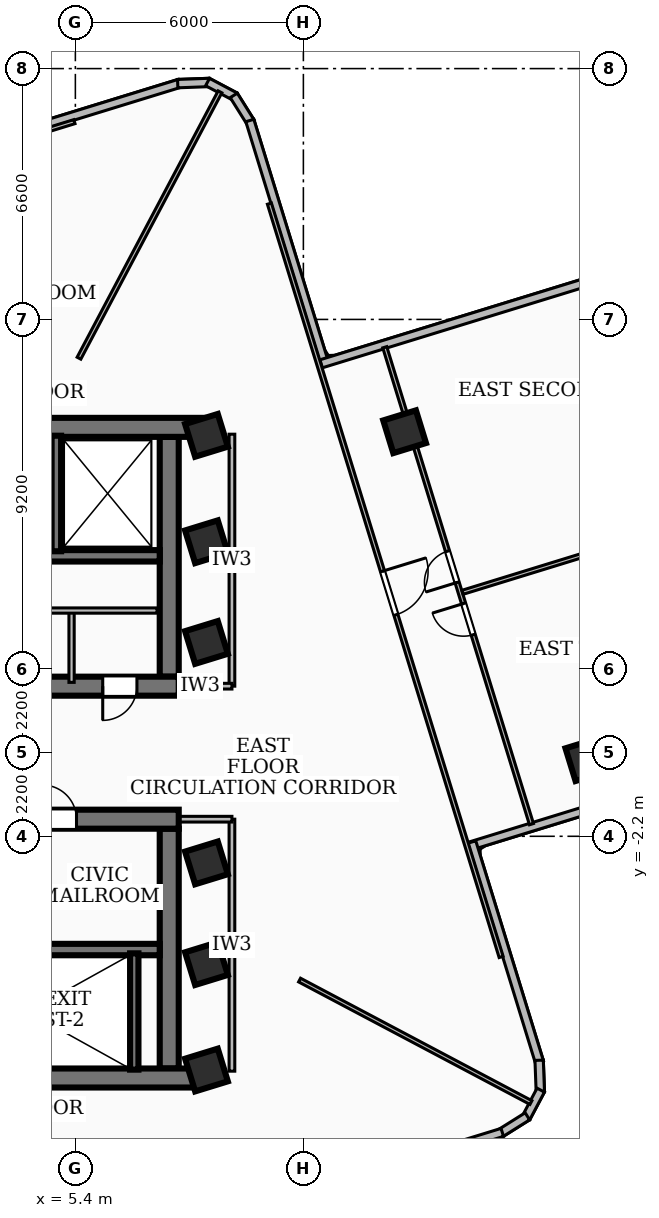
"""IFC4 building model, lengths in metres.
Left out: names, types, materials, properties, quantities, classifications, styles, units other than length and angle.
Written with IfcOpenShell. Run it as: python <this file> out.ifc"""

import sys

from ifc_helpers import new_model, si_unit, direction, frame, frame_2d, origin, origin_2d, place, context, subcontext, project, spatial, rectangle, extrude, element, fill, save


model = new_model("IFC4")
c1 = context("Model", 3, precision=1e-05, world=origin(), true_north=direction((0.0, 1.0)))
c2 = subcontext(c1, "Body", "Model", "MODEL_VIEW")
j1 = project(units=[si_unit("LENGTHUNIT", "METRE"), si_unit("PLANEANGLEUNIT", "RADIAN")], contexts=[c1])
p1 = place(None, origin())
s1 = spatial("IfcSite", under=j1, at=p1, CompositionType="ELEMENT")
p2 = place(p1, origin())
s2 = spatial("IfcBuilding", under=s1, at=p2, CompositionType="ELEMENT")
p3 = place(p2, frame((0.0, 0.0, 148.68)))
s3 = spatial("IfcBuildingStorey", under=s2, at=p3, CompositionType="ELEMENT", Elevation=148.68)
p4 = place(p3, frame((-8.78, 8.56, 0.0), z_axis=(0.0, 0.0, 1.0), x_axis=(1.0, 0.0, 0.0)))
e1 = element("IfcWall", 1, at=p4, inside=s3, PredefinedType="SHEAR", context=c2, shape_type="SweptSolid", body=[
    extrude(rectangle(XDim=17.56, YDim=0.5, at=frame_2d((8.78, 0.0))), origin(), (0.0, 0.0, 1.0), 3.32),
])
p5 = place(p3, frame((8.12, 1.75, 0.0), z_axis=(0.0, 0.0, 1.0), x_axis=(-1.0, 0.0, 0.0)))
e2 = element("IfcWall", 2, at=p5, inside=s3, PredefinedType="SHEAR", context=c2, shape_type="SweptSolid", body=[
    extrude(rectangle(XDim=16.24, YDim=0.5, at=frame_2d((8.12, 0.0))), origin(), (0.0, 0.0, 1.0), 3.32),
])
p6 = place(p5, frame((7.45, 0.0, 0.0)))
e3 = element("IfcOpeningElement", 3, at=p6, cuts=e2, PredefinedType="OPENING", context=c2, shape_type="SweptSolid", body=[
    extrude(rectangle(XDim=1.0, YDim=2.1, at=frame_2d((0.5, 1.05))), frame((0.0, 0.26, 0.0), z_axis=(0.0, -1.0, 0.0), x_axis=(1.0, 0.0, 0.0)), (0.0, 0.0, 1.0), 0.52),
])
p7 = place(p5, frame((3.4, 0.0, 0.0)))
e4 = element("IfcOpeningElement", 4, at=p7, cuts=e2, PredefinedType="OPENING", context=c2, shape_type="SweptSolid", body=[
    extrude(rectangle(XDim=0.9, YDim=2.06, at=frame_2d((0.45, 1.03))), frame((0.0, 0.26, 0.0), z_axis=(0.0, -1.0, 0.0), x_axis=(1.0, 0.0, 0.0)), (0.0, 0.0, 1.0), 0.52),
])
p8 = place(p5, frame((1.1, 0.0, 0.0)))
e5 = element("IfcOpeningElement", 5, at=p8, cuts=e2, PredefinedType="OPENING", context=c2, shape_type="SweptSolid", body=[
    extrude(rectangle(XDim=0.9, YDim=2.06, at=frame_2d((0.45, 1.03))), frame((0.0, 0.26, 0.0), z_axis=(0.0, -1.0, 0.0), x_axis=(1.0, 0.0, 0.0)), (0.0, 0.0, 1.0), 0.52),
])
p9 = place(p3, frame((7.87, 8.31, 0.0), z_axis=(0.0, 0.0, 1.0), x_axis=(0.0, -1.0, 0.0)))
e6 = element("IfcWall", 6, at=p9, inside=s3, PredefinedType="SHEAR", context=c2, shape_type="SweptSolid", body=[
    extrude(rectangle(XDim=6.31, YDim=0.5, at=frame_2d((3.155, 0.0))), origin(), (0.0, 0.0, 1.0), 3.32),
])
p10 = place(p3, frame((7.62, 5.18, 0.0), z_axis=(0.0, 0.0, 1.0), x_axis=(-1.0, 0.0, 0.0)))
e7 = element("IfcWall", 7, at=p10, inside=s3, PredefinedType="SOLIDWALL", context=c2, shape_type="SweptSolid", body=[
    extrude(rectangle(XDim=15.24, YDim=0.3, at=frame_2d((7.62, 0.0))), origin(), (0.0, 0.0, 1.0), 3.32),
])
p11 = place(p10, frame((5.77, 0.0, 0.0)))
e8 = element("IfcOpeningElement", 8, at=p11, cuts=e7, PredefinedType="OPENING", context=c2, shape_type="SweptSolid", body=[
    extrude(rectangle(XDim=1.1, YDim=2.15, at=frame_2d((0.55, 1.075))), frame((0.0, 0.16, 0.0), z_axis=(0.0, -1.0, 0.0), x_axis=(1.0, 0.0, 0.0)), (0.0, 0.0, 1.0), 0.32),
])
p12 = place(p10, frame((2.97, 0.0, 0.0)))
e9 = element("IfcOpeningElement", 9, at=p12, cuts=e7, PredefinedType="OPENING", context=c2, shape_type="SweptSolid", body=[
    extrude(rectangle(XDim=1.1, YDim=2.15, at=frame_2d((0.55, 1.075))), frame((0.0, 0.16, 0.0), z_axis=(0.0, -1.0, 0.0), x_axis=(1.0, 0.0, 0.0)), (0.0, 0.0, 1.0), 0.32),
])
p13 = place(p10, frame((7.97, 0.0, 0.0)))
e10 = element("IfcOpeningElement", 10, at=p13, cuts=e7, PredefinedType="OPENING", context=c2, shape_type="SweptSolid", body=[
    extrude(rectangle(XDim=1.0, YDim=2.1, at=frame_2d((0.5, 1.05))), frame((0.0, 0.16, 0.0), z_axis=(0.0, -1.0, 0.0), x_axis=(1.0, 0.0, 0.0)), (0.0, 0.0, 1.0), 0.32),
])
p14 = place(p3, frame((8.78, -8.56, 0.0), z_axis=(0.0, 0.0, 1.0), x_axis=(-1.0, 0.0, 0.0)))
e11 = element("IfcWall", 11, at=p14, inside=s3, PredefinedType="SHEAR", context=c2, shape_type="SweptSolid", body=[
    extrude(rectangle(XDim=17.56, YDim=0.5, at=frame_2d((8.78, 0.0))), origin(), (0.0, 0.0, 1.0), 3.32),
])
p15 = place(p3, frame((-8.12, -1.75, 0.0), z_axis=(0.0, 0.0, 1.0), x_axis=(1.0, 0.0, 0.0)))
e12 = element("IfcWall", 12, at=p15, inside=s3, PredefinedType="SHEAR", context=c2, shape_type="SweptSolid", body=[
    extrude(rectangle(XDim=16.24, YDim=0.5, at=frame_2d((8.12, 0.0))), origin(), (0.0, 0.0, 1.0), 3.32),
])
p16 = place(p15, frame((7.45, 0.0, 0.0)))
e13 = element("IfcOpeningElement", 13, at=p16, cuts=e12, PredefinedType="OPENING", context=c2, shape_type="SweptSolid", body=[
    extrude(rectangle(XDim=1.0, YDim=2.1, at=frame_2d((0.5, 1.05))), frame((0.0, 0.26, 0.0), z_axis=(0.0, -1.0, 0.0), x_axis=(1.0, 0.0, 0.0)), (0.0, 0.0, 1.0), 0.52),
])
p17 = place(p15, frame((12.65, 0.0, 0.0)))
e14 = element("IfcOpeningElement", 14, at=p17, cuts=e12, PredefinedType="OPENING", context=c2, shape_type="SweptSolid", body=[
    extrude(rectangle(XDim=0.9, YDim=2.06, at=frame_2d((0.45, 1.03))), frame((0.0, 0.26, 0.0), z_axis=(0.0, -1.0, 0.0), x_axis=(1.0, 0.0, 0.0)), (0.0, 0.0, 1.0), 0.52),
])
p18 = place(p15, frame((0.565, 0.0, 0.0)))
e15 = element("IfcOpeningElement", 15, at=p18, cuts=e12, PredefinedType="OPENING", context=c2, shape_type="SweptSolid", body=[
    extrude(rectangle(XDim=1.05, YDim=2.15, at=frame_2d((0.525, 1.075))), frame((0.0, 0.26, 0.0), z_axis=(0.0, -1.0, 0.0), x_axis=(1.0, 0.0, 0.0)), (0.0, 0.0, 1.0), 0.52),
])
p19 = place(p15, frame((2.125, 0.0, 0.0)))
e16 = element("IfcOpeningElement", 16, at=p19, cuts=e12, PredefinedType="OPENING", context=c2, shape_type="SweptSolid", body=[
    extrude(rectangle(XDim=1.05, YDim=2.15, at=frame_2d((0.525, 1.075))), frame((0.0, 0.26, 0.0), z_axis=(0.0, -1.0, 0.0), x_axis=(1.0, 0.0, 0.0)), (0.0, 0.0, 1.0), 0.52),
])
p20 = place(p15, frame((3.685, 0.0, 0.0)))
e17 = element("IfcOpeningElement", 17, at=p20, cuts=e12, PredefinedType="OPENING", context=c2, shape_type="SweptSolid", body=[
    extrude(rectangle(XDim=1.05, YDim=2.15, at=frame_2d((0.525, 1.075))), frame((0.0, 0.26, 0.0), z_axis=(0.0, -1.0, 0.0), x_axis=(1.0, 0.0, 0.0)), (0.0, 0.0, 1.0), 0.52),
])
p21 = place(p3, frame((7.87, -2.0, 0.0), z_axis=(0.0, 0.0, 1.0), x_axis=(0.0, -1.0, 0.0)))
e18 = element("IfcWall", 18, at=p21, inside=s3, PredefinedType="SHEAR", context=c2, shape_type="SweptSolid", body=[
    extrude(rectangle(XDim=6.31, YDim=0.5, at=frame_2d((3.155, 0.0))), origin(), (0.0, 0.0, 1.0), 3.32),
])
p22 = place(p3, frame((-7.62, -5.18, 0.0), z_axis=(0.0, 0.0, 1.0), x_axis=(1.0, 0.0, 0.0)))
e19 = element("IfcWall", 19, at=p22, inside=s3, PredefinedType="SOLIDWALL", context=c2, shape_type="SweptSolid", body=[
    extrude(rectangle(XDim=15.24, YDim=0.3, at=frame_2d((7.62, 0.0))), origin(), (0.0, 0.0, 1.0), 3.32),
])
p23 = place(p22, frame((5.77, 0.0, 0.0)))
e20 = element("IfcOpeningElement", 20, at=p23, cuts=e19, PredefinedType="OPENING", context=c2, shape_type="SweptSolid", body=[
    extrude(rectangle(XDim=1.1, YDim=2.15, at=frame_2d((0.55, 1.075))), frame((0.0, 0.16, 0.0), z_axis=(0.0, -1.0, 0.0), x_axis=(1.0, 0.0, 0.0)), (0.0, 0.0, 1.0), 0.32),
])
p24 = place(p22, frame((7.97, 0.0, 0.0)))
e21 = element("IfcOpeningElement", 21, at=p24, cuts=e19, PredefinedType="OPENING", context=c2, shape_type="SweptSolid", body=[
    extrude(rectangle(XDim=1.0, YDim=2.1, at=frame_2d((0.5, 1.05))), frame((0.0, 0.16, 0.0), z_axis=(0.0, -1.0, 0.0), x_axis=(1.0, 0.0, 0.0)), (0.0, 0.0, 1.0), 0.32),
])
p25 = place(p3, frame((6.95, -8.34, 0.0), z_axis=(0.0, 0.0, 1.0), x_axis=(0.0, 1.0, 0.0)))
e22 = element("IfcWall", 22, at=p25, inside=s3, PredefinedType="SOLIDWALL", context=c2, shape_type="SweptSolid", body=[
    extrude(rectangle(XDim=3.06, YDim=0.22, at=frame_2d((1.53, 0.0))), origin(), (0.0, 0.0, 1.0), 3.32),
])
p26 = place(p3, frame((4.9, 5.3, 0.0), z_axis=(0.0, 0.0, 1.0), x_axis=(0.0, 1.0, 0.0)))
e23 = element("IfcWall", 23, at=p26, inside=s3, PredefinedType="SOLIDWALL", context=c2, shape_type="SweptSolid", body=[
    extrude(rectangle(XDim=3.04, YDim=0.25, at=frame_2d((1.52, 0.0))), origin(), (0.0, 0.0, 1.0), 3.32),
])
for number, where, z_axis, x_axis in (
    (24, (8.85, -5.55, 0.0), (0.0, 0.0, 1.0), (0.956, 0.294, 0.0)),
    (25, (8.85, -2.9, 0.0), (0.0, 0.0, 1.0), (0.956, 0.294, 0.0)),
    (26, (8.85, 2.9, 0.0), (0.0, 0.0, 1.0), (0.956, 0.294, 0.0)),
    (27, (8.85, 5.55, 0.0), (0.0, 0.0, 1.0), (0.956, 0.294, 0.0)),
    (28, (8.85, -8.35, 0.0), (0.0, 0.0, 1.0), (0.956, 0.294, 0.0)),
    (29, (8.85, 8.35, 0.0), (0.0, 0.0, 1.0), (0.956, 0.294, 0.0)),
    (30, (18.86, -0.183, 0.0), (0.0, 0.0, 1.0), (0.956, 0.294, 0.0)),
    (31, (14.064, 8.445, 0.0), (0.0, 0.0, 1.0), (0.956, 0.294, 0.0)),
):
    element("IfcColumn", number, at=place(p3, frame(where, z_axis=z_axis, x_axis=x_axis)), inside=s3, PredefinedType="COLUMN", context=c2, shape_type="SweptSolid", body=[
        extrude(rectangle(XDim=0.9, YDim=0.9, at=origin_2d()), origin(), (0.0, 0.0, 1.0), 3.6),
    ])
p27 = place(p3, frame((2.351, 15.831, 0.0), z_axis=(0.0, 0.0, 1.0), x_axis=(0.955818207028, 0.293958424126, 0.0)))
e32 = element("IfcWall", 32, at=p27, inside=s3, PredefinedType="SOLIDWALL", context=c2, shape_type="SweptSolid", body=[
    extrude(rectangle(XDim=6.059, YDim=0.22, at=frame_2d((3.029, 0.0))), origin(), (0.0, 0.0, 1.0), 2.55),
])
p28 = place(p3, frame((8.093, 17.604, 0.0), z_axis=(0.0, 0.0, 1.0), x_axis=(0.999307996296, 0.037195813461, 0.0)))
e33 = element("IfcWall", 33, at=p28, inside=s3, PredefinedType="SOLIDWALL", context=c2, shape_type="SweptSolid", body=[
    extrude(rectangle(XDim=0.833, YDim=0.22, at=frame_2d((0.417, 0.0))), origin(), (0.0, 0.0, 1.0), 3.32),
])
p29 = place(p3, frame((8.879, 17.646, 0.0), z_axis=(0.0, 0.0, 1.0), x_axis=(0.883447158012, -0.46853080902, 0.0)))
e34 = element("IfcWall", 34, at=p29, inside=s3, PredefinedType="SOLIDWALL", context=c2, shape_type="SweptSolid", body=[
    extrude(rectangle(XDim=0.82, YDim=0.22, at=frame_2d((0.41, 0.0))), origin(), (0.0, 0.0, 1.0), 3.32),
])
p30 = place(p3, frame((9.568, 17.295, 0.0), z_axis=(0.0, 0.0, 1.0), x_axis=(0.531499315411, -0.847058721529, 0.0)))
e35 = element("IfcWall", 35, at=p30, inside=s3, PredefinedType="SOLIDWALL", context=c2, shape_type="SweptSolid", body=[
    extrude(rectangle(XDim=0.833, YDim=0.22, at=frame_2d((0.417, 0.0))), origin(), (0.0, 0.0, 1.0), 3.32),
])
p31 = place(p3, frame((9.991, 16.634, 0.0), z_axis=(0.0, 0.0, 1.0), x_axis=(0.294002082259, -0.955804779036, 0.0)))
e36 = element("IfcWall", 36, at=p31, inside=s3, PredefinedType="SOLIDWALL", context=c2, shape_type="SweptSolid", body=[
    extrude(rectangle(XDim=6.759, YDim=0.22, at=frame_2d((3.379, 0.0))), origin(), (0.0, 0.0, 1.0), 3.32),
])
p32 = place(p3, frame((11.868, 10.232, 0.0), z_axis=(0.0, 0.0, 1.0), x_axis=(0.955802538335, 0.29400936671, 0.0)))
e37 = element("IfcWall", 37, at=p32, inside=s3, PredefinedType="SOLIDWALL", context=c2, shape_type="SweptSolid", body=[
    extrude(rectangle(XDim=13.459, YDim=0.22, at=frame_2d((6.729, 0.0))), origin(), (0.0, 0.0, 1.0), 3.32),
])
p33 = place(p32, frame((10.259, 0.0, 0.85)))
e38 = element("IfcOpeningElement", 38, at=p33, cuts=e37, PredefinedType="OPENING", context=c2, shape_type="SweptSolid", body=[
    extrude(rectangle(XDim=2.1, YDim=1.8, at=frame_2d((1.05, 0.9))), frame((0.0, 0.12, 0.0), z_axis=(0.0, -1.0, 0.0), x_axis=(1.0, 0.0, 0.0)), (0.0, 0.0, 1.0), 0.24),
])
p34 = place(p3, frame((28.637, 1.496, 0.0), z_axis=(0.0, 0.0, 1.0), x_axis=(-0.955802538335, -0.29400936671, 0.0)))
e39 = element("IfcWall", 39, at=p34, inside=s3, PredefinedType="SOLIDWALL", context=c2, shape_type="SweptSolid", body=[
    extrude(rectangle(XDim=13.459, YDim=0.22, at=frame_2d((6.729, 0.0))), origin(), (0.0, 0.0, 1.0), 3.32),
])
p35 = place(p34, frame((0.85, 0.0, 0.85)))
e40 = element("IfcOpeningElement", 40, at=p35, cuts=e39, PredefinedType="OPENING", context=c2, shape_type="SweptSolid", body=[
    extrude(rectangle(XDim=2.7, YDim=2.1, at=frame_2d((1.35, 1.05))), frame((0.0, 0.12, 0.0), z_axis=(0.0, -1.0, 0.0), x_axis=(1.0, 0.0, 0.0)), (0.0, 0.0, 1.0), 0.24),
])
p36 = place(p3, frame((15.831, -2.351, 0.0), z_axis=(0.0, 0.0, 1.0), x_axis=(0.293958424126, -0.955818207028, 0.0)))
e41 = element("IfcWall", 41, at=p36, inside=s3, PredefinedType="SOLIDWALL", context=c2, shape_type="SweptSolid", body=[
    extrude(rectangle(XDim=6.059, YDim=0.22, at=frame_2d((3.029, 0.0))), origin(), (0.0, 0.0, 1.0), 3.32),
])
p37 = place(p3, frame((17.604, -8.093, 0.0), z_axis=(0.0, 0.0, 1.0), x_axis=(0.037195813461, -0.999307996296, 0.0)))
e42 = element("IfcWall", 42, at=p37, inside=s3, PredefinedType="SOLIDWALL", context=c2, shape_type="SweptSolid", body=[
    extrude(rectangle(XDim=0.833, YDim=0.22, at=frame_2d((0.417, 0.0))), origin(), (0.0, 0.0, 1.0), 3.32),
])
p38 = place(p3, frame((17.646, -8.879, 0.0), z_axis=(0.0, 0.0, 1.0), x_axis=(-0.46853080902, -0.883447158012, 0.0)))
e43 = element("IfcWall", 43, at=p38, inside=s3, PredefinedType="SOLIDWALL", context=c2, shape_type="SweptSolid", body=[
    extrude(rectangle(XDim=0.82, YDim=0.22, at=frame_2d((0.41, 0.0))), origin(), (0.0, 0.0, 1.0), 3.32),
])
p39 = place(p3, frame((17.295, -9.568, 0.0), z_axis=(0.0, 0.0, 1.0), x_axis=(-0.847058721529, -0.531499315411, 0.0)))
e44 = element("IfcWall", 44, at=p39, inside=s3, PredefinedType="SOLIDWALL", context=c2, shape_type="SweptSolid", body=[
    extrude(rectangle(XDim=0.833, YDim=0.22, at=frame_2d((0.417, 0.0))), origin(), (0.0, 0.0, 1.0), 3.32),
])
p40 = place(p3, frame((16.634, -9.991, 0.0), z_axis=(0.0, 0.0, 1.0), x_axis=(-0.955804779036, -0.294002082259, 0.0)))
e45 = element("IfcWall", 45, at=p40, inside=s3, PredefinedType="SOLIDWALL", context=c2, shape_type="SweptSolid", body=[
    extrude(rectangle(XDim=6.759, YDim=0.22, at=frame_2d((3.379, 0.0))), origin(), (0.0, 0.0, 1.0), 3.32),
])
p41 = place(p3, frame((2.9, 3.74, 0.0), z_axis=(0.0, 0.0, 1.0), x_axis=(1.0, 0.0, 0.0)))
e46 = element("IfcWall", 46, at=p41, inside=s3, PredefinedType="PARTITIONING", context=c2, shape_type="SweptSolid", body=[
    extrude(rectangle(XDim=4.65, YDim=0.138, at=frame_2d((2.325, 0.0))), origin(), (0.0, 0.0, 1.0), 3.32),
])
p42 = place(p3, frame((5.3, 1.85, 0.0), z_axis=(0.0, 0.0, 1.0), x_axis=(0.0, 1.0, 0.0)))
e47 = element("IfcWall", 47, at=p42, inside=s3, PredefinedType="PARTITIONING", context=c2, shape_type="SweptSolid", body=[
    extrude(rectangle(XDim=1.89, YDim=0.138, at=frame_2d((0.945, 0.0))), origin(), (0.0, 0.0, 1.0), 2.55),
])
p43 = place(p3, frame((9.52, 1.75, 0.0), z_axis=(0.0, 0.0, 1.0), x_axis=(0.0, 1.0, 0.0)))
e48 = element("IfcWall", 48, at=p43, inside=s3, PredefinedType="PARTITIONING", context=c2, shape_type="SweptSolid", body=[
    extrude(rectangle(XDim=6.63, YDim=0.15, at=frame_2d((3.315, 0.0))), origin(), (0.0, 0.0, 1.0), 2.55),
])
p44 = place(p3, frame((7.85, 1.75, 0.0), z_axis=(0.0, 0.0, 1.0), x_axis=(1.0, 0.0, 0.0)))
e49 = element("IfcWall", 49, at=p44, inside=s3, PredefinedType="PARTITIONING", context=c2, shape_type="SweptSolid", body=[
    extrude(rectangle(XDim=1.67, YDim=0.15, at=frame_2d((0.835, 0.0))), origin(), (0.0, 0.0, 1.0), 2.55),
])
p45 = place(p3, frame((9.52, -8.38, 0.0), z_axis=(0.0, 0.0, 1.0), x_axis=(0.0, 1.0, 0.0)))
e50 = element("IfcWall", 50, at=p45, inside=s3, PredefinedType="PARTITIONING", context=c2, shape_type="SweptSolid", body=[
    extrude(rectangle(XDim=6.63, YDim=0.15, at=frame_2d((3.315, 0.0))), origin(), (0.0, 0.0, 1.0), 2.55),
])
p46 = place(p3, frame((7.85, -1.75, 0.0), z_axis=(0.0, 0.0, 1.0), x_axis=(1.0, 0.0, 0.0)))
e51 = element("IfcWall", 51, at=p46, inside=s3, PredefinedType="PARTITIONING", context=c2, shape_type="SweptSolid", body=[
    extrude(rectangle(XDim=1.67, YDim=0.15, at=frame_2d((0.835, 0.0))), origin(), (0.0, 0.0, 1.0), 2.55),
])
p47 = place(p3, frame((5.495, 10.38, 0.0), z_axis=(0.0, 0.0, 1.0), x_axis=(0.467965518706, 0.883746724635, 0.0)))
e52 = element("IfcWall", 52, at=p47, inside=s3, PredefinedType="PARTITIONING", context=c2, shape_type="SweptSolid", body=[
    extrude(rectangle(XDim=7.93, YDim=0.11, at=frame_2d((3.965, 0.0))), origin(), (0.0, 0.0, 1.0), 2.55),
])
p48 = place(p3, frame((11.3, -5.983, 0.0), z_axis=(0.0, 0.0, 1.0), x_axis=(0.883779295194, -0.467904004457, 0.0)))
e53 = element("IfcWall", 53, at=p48, inside=s3, PredefinedType="PARTITIONING", context=c2, shape_type="SweptSolid", body=[
    extrude(rectangle(XDim=6.888, YDim=0.11, at=frame_2d((3.444, 0.0))), origin(), (0.0, 0.0, 1.0), 3.32),
])
p49 = place(p3, frame((10.506, 14.447, 0.0), z_axis=(0.0, 0.0, 1.0), x_axis=(0.294033732643, -0.955795042919, 0.0)))
e54 = element("IfcWall", 54, at=p49, inside=s3, PredefinedType="PARTITIONING", context=c2, shape_type="SweptSolid", body=[
    extrude(rectangle(XDim=20.739, YDim=0.11, at=frame_2d((10.369, 0.0))), origin(), (0.0, 0.0, 1.0), 2.55),
])
p50 = place(p49, frame((10.12, 0.0, 0.0)))
e55 = element("IfcOpeningElement", 55, at=p50, cuts=e54, PredefinedType="OPENING", context=c2, shape_type="SweptSolid", body=[
    extrude(rectangle(XDim=1.2, YDim=2.1, at=frame_2d((0.6, 1.05))), frame((0.0, 0.065, 0.0), z_axis=(0.0, -1.0, 0.0), x_axis=(1.0, 0.0, 0.0)), (0.0, 0.0, 1.0), 0.13),
])
p51 = place(p3, frame((15.588, 4.22, 0.0), z_axis=(0.0, 0.0, 1.0), x_axis=(0.95578506432, 0.294066167422, 0.0)))
e56 = element("IfcWall", 56, at=p51, inside=s3, PredefinedType="PARTITIONING", context=c2, shape_type="SweptSolid", body=[
    extrude(rectangle(XDim=13.075, YDim=0.11, at=frame_2d((6.538, 0.0))), origin(), (0.0, 0.0, 1.0), 2.812),
])
p52 = place(p3, frame((17.402, -1.881, 0.0), z_axis=(0.0, 0.0, 1.0), x_axis=(-0.294006140437, 0.955803530745, 0.0)))
e57 = element("IfcWall", 57, at=p52, inside=s3, PredefinedType="PARTITIONING", context=c2, shape_type="SweptSolid", body=[
    extrude(rectangle(XDim=13.129, YDim=0.11, at=frame_2d((6.565, 0.0))), origin(), (0.0, 0.0, 1.0), 2.55),
])
p53 = place(p52, frame((5.215, 0.0, 0.0)))
e58 = element("IfcOpeningElement", 58, at=p53, cuts=e57, PredefinedType="OPENING", context=c2, shape_type="SweptSolid", body=[
    extrude(rectangle(XDim=0.86, YDim=2.04, at=frame_2d((0.43, 1.02))), frame((0.0, 0.065, 0.0), z_axis=(0.0, -1.0, 0.0), x_axis=(1.0, 0.0, 0.0)), (0.0, 0.0, 1.0), 0.13),
])
p54 = place(p52, frame((6.655, 0.0, 0.0)))
e59 = element("IfcOpeningElement", 59, at=p54, cuts=e57, PredefinedType="OPENING", context=c2, shape_type="SweptSolid", body=[
    extrude(rectangle(XDim=0.86, YDim=2.04, at=frame_2d((0.43, 1.02))), frame((0.0, 0.065, 0.0), z_axis=(0.0, -1.0, 0.0), x_axis=(1.0, 0.0, 0.0)), (0.0, 0.0, 1.0), 0.13),
])
p55 = place(p3, frame((-14.447, 10.506, 0.0), z_axis=(0.0, 0.0, 1.0), x_axis=(0.955795042919, 0.294033732643, 0.0)))
e60 = element("IfcWall", 60, at=p55, inside=s3, PredefinedType="PARTITIONING", context=c2, shape_type="SweptSolid", body=[
    extrude(rectangle(XDim=20.739, YDim=0.11, at=frame_2d((10.369, 0.0))), origin(), (0.0, 0.0, 1.0), 2.55),
])
p56 = place(p55, frame((10.12, 0.0, 0.0)))
e61 = element("IfcOpeningElement", 61, at=p56, cuts=e60, PredefinedType="OPENING", context=c2, shape_type="SweptSolid", body=[
    extrude(rectangle(XDim=1.2, YDim=2.1, at=frame_2d((0.6, 1.05))), frame((0.0, 0.065, 0.0), z_axis=(0.0, -1.0, 0.0), x_axis=(1.0, 0.0, 0.0)), (0.0, 0.0, 1.0), 0.13),
])
p57 = place(p17, origin())
e62 = element("IfcDoor", 62, at=p57, inside=s3, OperationType="SINGLE_SWING_LEFT", PredefinedType="DOOR", context=c2, shape_type="SweptSolid", body=[
    extrude(rectangle(XDim=0.9, YDim=2.06, at=frame_2d((0.45, 1.03))), frame((0.0, 0.025, 0.0), z_axis=(0.0, -1.0, 0.0), x_axis=(1.0, 0.0, 0.0)), (0.0, 0.0, 1.0), 0.05),
])
fill(e14, e62)
p58 = place(p8, origin())
e63 = element("IfcDoor", 63, at=p58, inside=s3, OperationType="SINGLE_SWING_RIGHT", PredefinedType="DOOR", context=c2, shape_type="SweptSolid", body=[
    extrude(rectangle(XDim=0.9, YDim=2.06, at=frame_2d((0.45, 1.03))), frame((0.0, 0.025, 0.0), z_axis=(0.0, -1.0, 0.0), x_axis=(1.0, 0.0, 0.0)), (0.0, 0.0, 1.0), 0.05),
])
fill(e5, e63)
p59 = place(p50, origin())
e64 = element("IfcDoor", 64, at=p59, inside=s3, OperationType="SINGLE_SWING_LEFT", PredefinedType="DOOR", context=c2, shape_type="SweptSolid", body=[
    extrude(rectangle(XDim=1.2, YDim=2.1, at=frame_2d((0.6, 1.05))), frame((0.0, 0.025, 0.0), z_axis=(0.0, -1.0, 0.0), x_axis=(1.0, 0.0, 0.0)), (0.0, 0.0, 1.0), 0.05),
])
fill(e55, e64)
p60 = place(p53, origin())
e65 = element("IfcDoor", 65, at=p60, inside=s3, OperationType="SINGLE_SWING_RIGHT", PredefinedType="DOOR", context=c2, shape_type="SweptSolid", body=[
    extrude(rectangle(XDim=0.86, YDim=2.04, at=frame_2d((0.43, 1.02))), frame((0.0, 0.025, 0.0), z_axis=(0.0, -1.0, 0.0), x_axis=(1.0, 0.0, 0.0)), (0.0, 0.0, 1.0), 0.05),
])
fill(e58, e65)
p61 = place(p54, origin())
e66 = element("IfcDoor", 66, at=p61, inside=s3, OperationType="SINGLE_SWING_LEFT", PredefinedType="DOOR", context=c2, shape_type="SweptSolid", body=[
    extrude(rectangle(XDim=0.86, YDim=2.04, at=frame_2d((0.43, 1.02))), frame((0.0, 0.025, 0.0), z_axis=(0.0, -1.0, 0.0), x_axis=(1.0, 0.0, 0.0)), (0.0, 0.0, 1.0), 0.05),
])
fill(e59, e66)
save(model, sys.argv[1])
